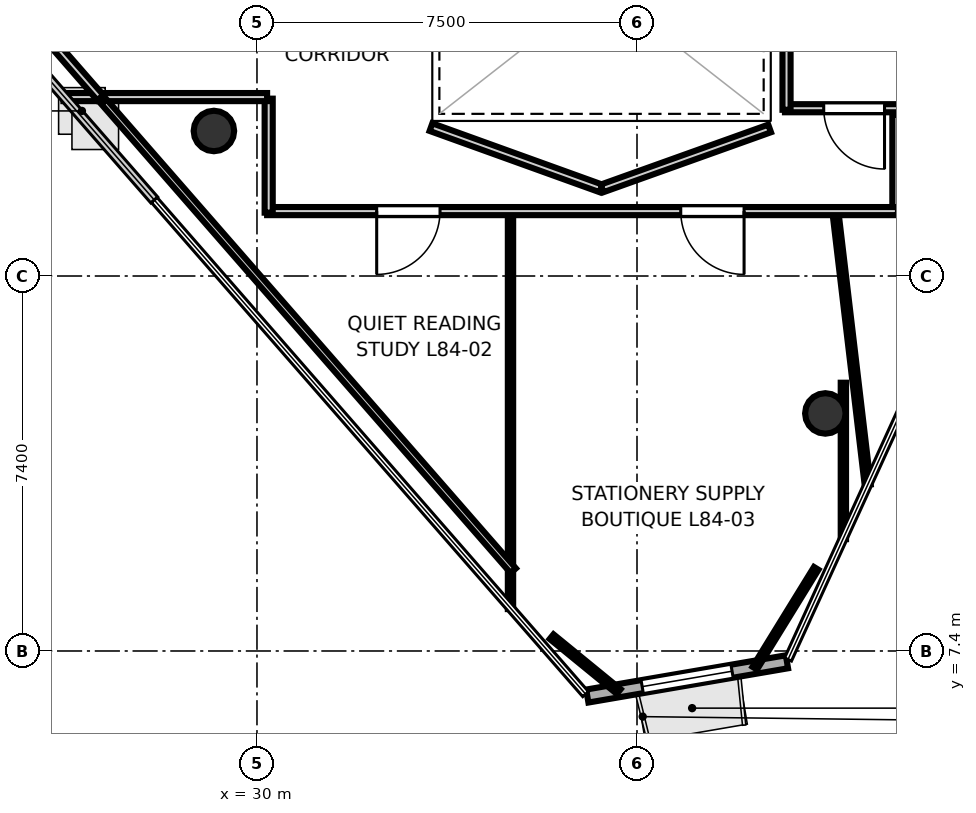
"""IFC4 building model, lengths in metres.
Left out: names, types, materials, properties, quantities, classifications, styles, units other than length and angle.
Written with IfcOpenShell. Run it as: python <this file> out.ifc"""

import sys

from ifc_helpers import new_model, si_unit, direction, frame, frame_2d, origin, origin_2d, place, context, subcontext, project, spatial, rectangle, hollow_circle, extrude, element, fill, save


model = new_model("IFC4")
c1 = context("Model", 3, precision=1e-05, world=origin(), true_north=direction((0.0, 1.0)))
c2 = subcontext(c1, "Body", "Model", "MODEL_VIEW")
j1 = project(units=[si_unit("LENGTHUNIT", "METRE"), si_unit("PLANEANGLEUNIT", "RADIAN")], contexts=[c1])
p1 = place(None, origin())
s1 = spatial("IfcSite", under=j1, at=p1, CompositionType="ELEMENT")
p2 = place(p1, origin())
s2 = spatial("IfcBuilding", under=s1, at=p2, CompositionType="ELEMENT")
p3 = place(p2, frame((0.0, 0.0, 325.9)))
s3 = spatial("IfcBuildingStorey", under=s2, at=p3, CompositionType="ELEMENT", Elevation=325.9)
for number, where, z_axis, x_axis in (
    (1, (29.15, 17.662, -0.23), (0.0, 0.0, 1.0), (1.0, 0.0, 0.0)),
    (2, (41.217, 12.088, -0.23), (0.0, 0.0, 1.0), (1.0, 0.0, 0.0)),
):
    element("IfcColumn", number, at=place(p3, frame(where, z_axis=z_axis, x_axis=x_axis)), inside=s3, PredefinedType="COLUMN", context=c2, shape_type="SweptSolid", body=[
        extrude(hollow_circle(Radius=0.4, WallThickness=0.022, at=origin_2d()), origin(), (0.0, 0.0, 1.0), 3.93),
    ])
p4 = place(p3, frame((36.519, 6.511, 0.0), z_axis=(0.0, 0.0, 1.0), x_axis=(0.985600454731, 0.169090933033, 0.0)))
e3 = element("IfcWall", 3, at=p4, inside=s3, PredefinedType="SOLIDWALL", context=c2, shape_type="SweptSolid", body=[
    extrude(rectangle(XDim=3.998, YDim=0.26, at=frame_2d((1.999, 0.0))), origin(), (0.0, 0.0, 1.0), 3.52),
])
p5 = place(p4, frame((1.099, 0.0, 0.85)))
e4 = element("IfcOpeningElement", 4, at=p5, cuts=e3, PredefinedType="OPENING", context=c2, shape_type="SweptSolid", body=[
    extrude(rectangle(XDim=1.8, YDim=2.1, at=frame_2d((0.9, 1.05))), frame((0.0, 0.14, 0.0), z_axis=(0.0, -1.0, 0.0), x_axis=(1.0, 0.0, 0.0)), (0.0, 0.0, 1.0), 0.28),
])
p6 = place(p3, frame((43.15, 18.111, 0.0), z_axis=(0.0, 0.0, 1.0), x_axis=(-1.0, 0.0, 0.0)))
e5 = element("IfcWall", 5, at=p6, inside=s3, PredefinedType="PARTITIONING", context=c2, shape_type="SweptSolid", body=[
    extrude(rectangle(XDim=2.73, YDim=0.16, at=frame_2d((1.365, 0.0))), origin(), (0.0, 0.0, 1.0), 2.84),
])
p7 = place(p6, frame((0.765, 0.0, 0.0)))
e6 = element("IfcOpeningElement", 6, at=p7, cuts=e5, PredefinedType="OPENING", context=c2, shape_type="SweptSolid", body=[
    extrude(rectangle(XDim=1.2, YDim=2.15, at=frame_2d((0.6, 1.075))), frame((0.0, 0.09, 0.0), z_axis=(0.0, -1.0, 0.0), x_axis=(1.0, 0.0, 0.0)), (0.0, 0.0, 1.0), 0.18),
])
p8 = place(p3, frame((40.451, 18.08, 0.0), z_axis=(0.0, 0.0, 1.0), x_axis=(0.0, 1.0, 0.0)))
e7 = element("IfcWall", 7, at=p8, inside=s3, PredefinedType="PARTITIONING", context=c2, shape_type="SweptSolid", body=[
    extrude(rectangle(XDim=3.32, YDim=0.16, at=frame_2d((1.66, 0.0))), origin(), (0.0, 0.0, 1.0), 2.84),
])
p9 = place(p3, frame((33.434, 17.738, 0.0), z_axis=(0.0, 0.0, 1.0), x_axis=(0.940782662834, -0.339010296764, 0.0)))
e8 = element("IfcWall", 8, at=p9, inside=s3, PredefinedType="PARTITIONING", context=c2, shape_type="SweptSolid", body=[
    extrude(rectangle(XDim=3.567, YDim=0.16, at=frame_2d((1.783, 0.0))), origin(), (0.0, 0.0, 1.0), 2.84),
])
p10 = place(p3, frame((36.81, 16.529, 0.0), z_axis=(0.0, 0.0, 1.0), x_axis=(0.941548344365, 0.33687789364, 0.0)))
e9 = element("IfcWall", 9, at=p10, inside=s3, PredefinedType="PARTITIONING", context=c2, shape_type="SweptSolid", body=[
    extrude(rectangle(XDim=3.513, YDim=0.16, at=frame_2d((1.756, 0.0))), origin(), (0.0, 0.0, 1.0), 2.84),
])
p11 = place(p3, frame((42.619, 17.98, 0.0), z_axis=(0.0, 0.0, 1.0), x_axis=(0.0, -1.0, 0.0)))
e10 = element("IfcWall", 10, at=p11, inside=s3, PredefinedType="PARTITIONING", context=c2, shape_type="SweptSolid", body=[
    extrude(rectangle(XDim=1.93, YDim=0.16, at=frame_2d((0.965, 0.0))), origin(), (0.0, 0.0, 1.0), 2.84),
])
p12 = place(p3, frame((42.65, 16.081, 0.0), z_axis=(0.0, 0.0, 1.0), x_axis=(-1.0, 0.0, 0.0)))
e11 = element("IfcWall", 11, at=p12, inside=s3, PredefinedType="PARTITIONING", context=c2, shape_type="SweptSolid", body=[
    extrude(rectangle(XDim=12.45, YDim=0.16, at=frame_2d((6.225, 0.0))), origin(), (0.0, 0.0, 1.0), 2.84),
])
p13 = place(p12, frame((9.037, 0.0, 0.0)))
e12 = element("IfcOpeningElement", 12, at=p13, cuts=e11, PredefinedType="OPENING", context=c2, shape_type="SweptSolid", body=[
    extrude(rectangle(XDim=1.25, YDim=2.2, at=frame_2d((0.625, 1.1))), frame((0.0, 0.09, 0.0), z_axis=(0.0, -1.0, 0.0), x_axis=(1.0, 0.0, 0.0)), (0.0, 0.0, 1.0), 0.18),
])
p14 = place(p12, frame((3.037, 0.0, 0.0)))
e13 = element("IfcOpeningElement", 13, at=p14, cuts=e11, PredefinedType="OPENING", context=c2, shape_type="SweptSolid", body=[
    extrude(rectangle(XDim=1.25, YDim=2.2, at=frame_2d((0.625, 1.1))), frame((0.0, 0.09, 0.0), z_axis=(0.0, -1.0, 0.0), x_axis=(1.0, 0.0, 0.0)), (0.0, 0.0, 1.0), 0.18),
])
p15 = place(p3, frame((30.231, 16.05, 0.0), z_axis=(0.0, 0.0, 1.0), x_axis=(0.0, 1.0, 0.0)))
e14 = element("IfcWall", 14, at=p15, inside=s3, PredefinedType="PARTITIONING", context=c2, shape_type="SweptSolid", body=[
    extrude(rectangle(XDim=2.25, YDim=0.16, at=frame_2d((1.125, 0.0))), origin(), (0.0, 0.0, 1.0), 2.84),
])
p16 = place(p3, frame((30.2, 18.331, 0.0), z_axis=(0.0, 0.0, 1.0), x_axis=(-1.0, 0.0, 0.0)))
e15 = element("IfcWall", 15, at=p16, inside=s3, PredefinedType="PARTITIONING", context=c2, shape_type="SweptSolid", body=[
    extrude(rectangle(XDim=4.02, YDim=0.16, at=frame_2d((2.01, 0.0))), origin(), (0.0, 0.0, 1.0), 2.84),
])
p17 = place(p3, frame((26.908, 18.32, 0.0), z_axis=(0.0, 0.0, 1.0), x_axis=(-0.657555722756, 0.753405914147, 0.0)))
e16 = element("IfcWall", 16, at=p17, inside=s3, PredefinedType="PARTITIONING", context=c2, shape_type="SweptSolid", body=[
    extrude(rectangle(XDim=1.877, YDim=0.16, at=frame_2d((0.938, 0.0))), origin(), (0.0, 0.0, 1.0), 2.84),
])
p18 = place(p3, frame((35.003, 15.971, 0.0), z_axis=(0.0, 0.0, 1.0), x_axis=(0.0, -1.0, 0.0)))
e17 = element("IfcWall", 17, at=p18, inside=s3, PredefinedType="PARTITIONING", context=c2, shape_type="SweptSolid", body=[
    extrude(rectangle(XDim=7.744, YDim=0.105, at=frame_2d((3.872, 0.0))), origin(), (0.0, 0.0, 1.0), 2.84),
])
p19 = place(p3, frame((35.058, 8.985, 0.0), z_axis=(0.0, 0.0, 1.0), x_axis=(-0.657637601848, 0.753334444079, 0.0)))
e18 = element("IfcWall", 18, at=p19, inside=s3, PredefinedType="PARTITIONING", context=c2, shape_type="SweptSolid", body=[
    extrude(rectangle(XDim=12.287, YDim=0.14, at=frame_2d((6.143, 0.0))), origin(), (0.0, 0.0, 1.0), 2.84),
])
p20 = place(p3, frame((41.427, 15.97, 0.0), z_axis=(0.0, 0.0, 1.0), x_axis=(0.117495284086, -0.993073440495, 0.0)))
e19 = element("IfcWall", 19, at=p20, inside=s3, PredefinedType="PARTITIONING", context=c2, shape_type="SweptSolid", body=[
    extrude(rectangle(XDim=5.328, YDim=0.12, at=frame_2d((2.664, 0.0))), origin(), (0.0, 0.0, 1.0), 2.84),
])
p21 = place(p3, frame((41.037, 9.031, 0.0), z_axis=(0.0, 0.0, 1.0), x_axis=(-0.524362349403, -0.851495229892, 0.0)))
e20 = element("IfcWall", 20, at=p21, inside=s3, PredefinedType="PARTITIONING", context=c2, shape_type="SweptSolid", body=[
    extrude(rectangle(XDim=2.313, YDim=0.105, at=frame_2d((1.157, 0.0))), origin(), (0.0, 0.0, 1.0), 2.84),
])
p22 = place(p3, frame((37.139, 6.6, 0.0), z_axis=(0.0, 0.0, 1.0), x_axis=(-0.774243203932, 0.632888190097, 0.0)))
e21 = element("IfcWall", 21, at=p22, inside=s3, PredefinedType="PARTITIONING", context=c2, shape_type="SweptSolid", body=[
    extrude(rectangle(XDim=1.712, YDim=0.12, at=frame_2d((0.856, 0.0))), origin(), (0.0, 0.0, 1.0), 2.84),
])
p23 = place(p3, frame((41.573, 9.607, 0.0), z_axis=(0.0, 0.0, 1.0), x_axis=(0.0, 1.0, 0.0)))
e22 = element("IfcWall", 22, at=p23, inside=s3, PredefinedType="PARTITIONING", context=c2, shape_type="SweptSolid", body=[
    extrude(rectangle(XDim=3.087, YDim=0.105, at=frame_2d((1.543, 0.0))), origin(), (0.0, 0.0, 1.0), 2.84),
])
p24 = place(p7, origin())
e23 = element("IfcDoor", 23, at=p24, inside=s3, OperationType="SINGLE_SWING_LEFT", PredefinedType="DOOR", context=c2, shape_type="SweptSolid", body=[
    extrude(rectangle(XDim=1.2, YDim=2.15, at=frame_2d((0.6, 1.075))), frame((0.0, 0.025, 0.0), z_axis=(0.0, -1.0, 0.0), x_axis=(1.0, 0.0, 0.0)), (0.0, 0.0, 1.0), 0.05),
])
fill(e6, e23)
p25 = place(p13, origin())
e24 = element("IfcDoor", 24, at=p25, inside=s3, OperationType="SINGLE_SWING_RIGHT", PredefinedType="DOOR", context=c2, shape_type="SweptSolid", body=[
    extrude(rectangle(XDim=1.25, YDim=2.2, at=frame_2d((0.625, 1.1))), frame((0.0, 0.025, 0.0), z_axis=(0.0, -1.0, 0.0), x_axis=(1.0, 0.0, 0.0)), (0.0, 0.0, 1.0), 0.05),
])
fill(e12, e24)
p26 = place(p14, origin())
e25 = element("IfcDoor", 25, at=p26, inside=s3, OperationType="SINGLE_SWING_LEFT", PredefinedType="DOOR", context=c2, shape_type="SweptSolid", body=[
    extrude(rectangle(XDim=1.25, YDim=2.2, at=frame_2d((0.625, 1.1))), frame((0.0, 0.025, 0.0), z_axis=(0.0, -1.0, 0.0), x_axis=(1.0, 0.0, 0.0)), (0.0, 0.0, 1.0), 0.05),
])
fill(e13, e25)
p27 = place(p5, origin())
e26 = element("IfcWindow", 26, at=p27, inside=s3, PartitioningType="SINGLE_PANEL", PredefinedType="WINDOW", context=c2, shape_type="SweptSolid", body=[
    extrude(rectangle(XDim=1.8, YDim=2.1, at=frame_2d((0.9, 1.05))), frame((0.0, 0.03, 0.0), z_axis=(0.0, -1.0, 0.0), x_axis=(1.0, 0.0, 0.0)), (0.0, 0.0, 1.0), 0.06),
])
fill(e4, e26)
save(model, sys.argv[1])
